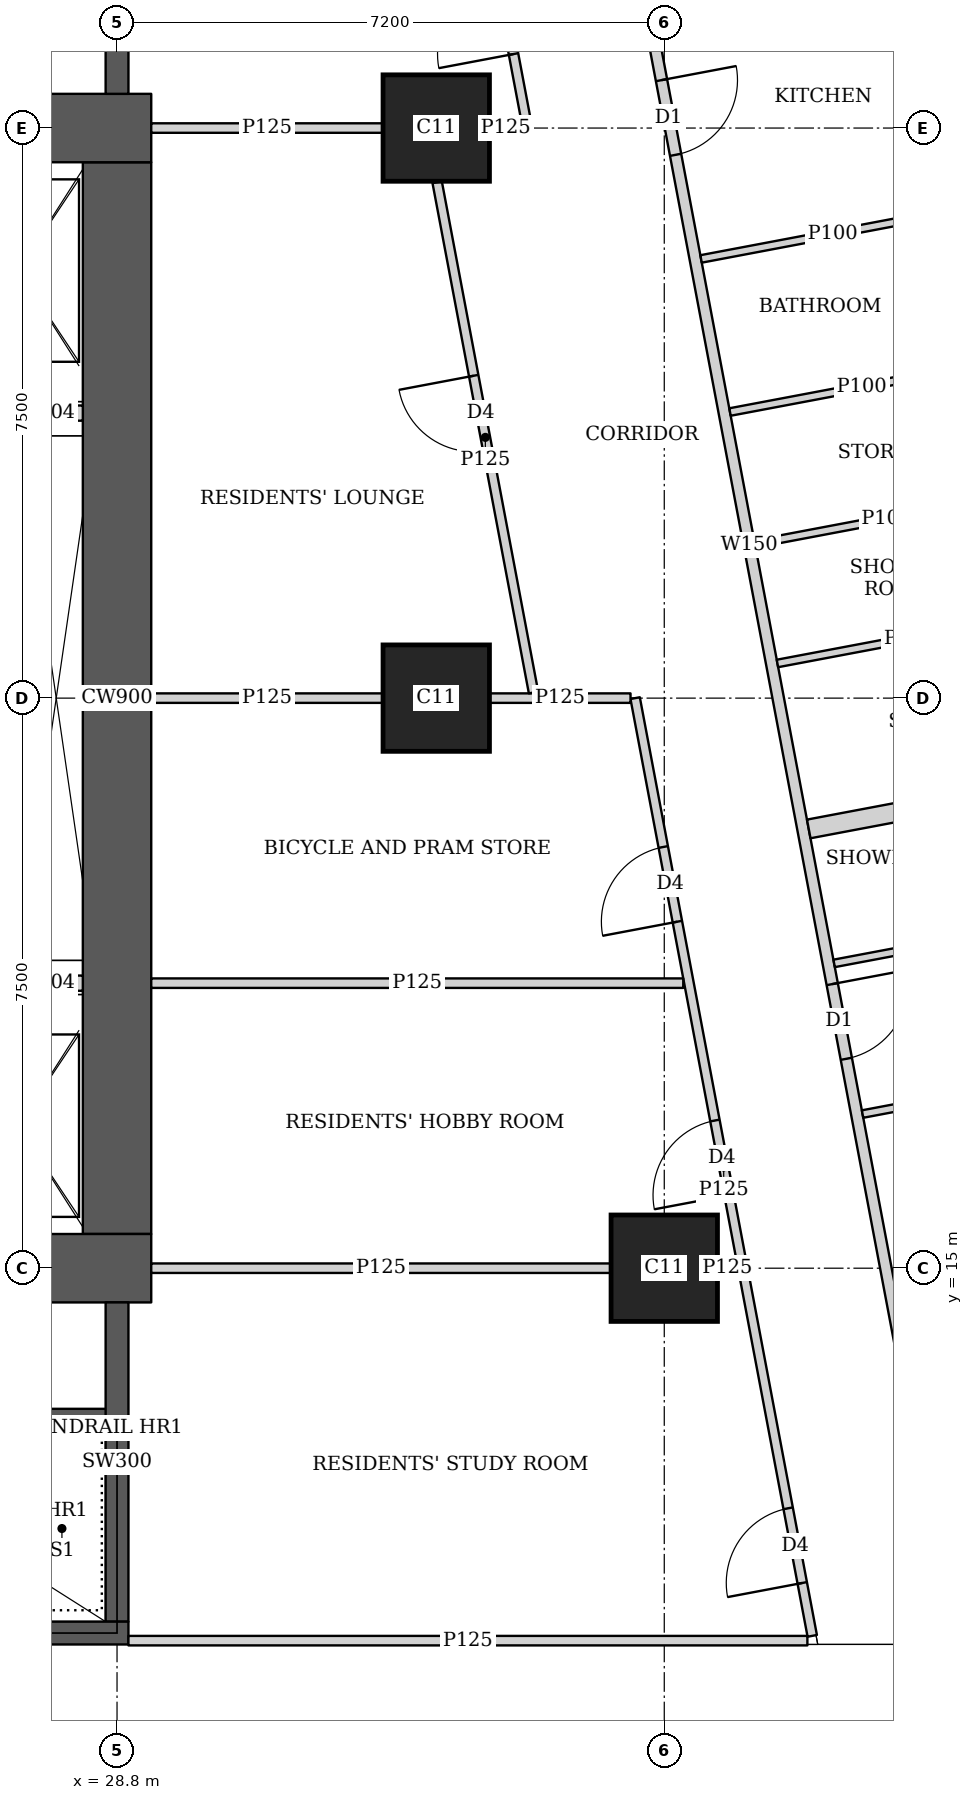
"""IFC4 building model, lengths in metres.
Left out: names, types, materials, properties, quantities, classifications, styles, units other than length and angle.
Written with IfcOpenShell. Run it as: python <this file> out.ifc"""

import sys

from ifc_helpers import new_model, si_unit, direction, frame, frame_2d, origin, origin_2d, place, context, subcontext, project, spatial, rectangle, extrude, element, fill, save


model = new_model("IFC4")
c1 = context("Model", 3, precision=1e-05, world=origin(), true_north=direction((0.0, 1.0)))
c2 = subcontext(c1, "Body", "Model", "MODEL_VIEW")
j1 = project(units=[si_unit("LENGTHUNIT", "METRE"), si_unit("PLANEANGLEUNIT", "RADIAN")], contexts=[c1])
p1 = place(None, origin())
s1 = spatial("IfcSite", under=j1, at=p1, CompositionType="ELEMENT")
p2 = place(p1, origin())
s2 = spatial("IfcBuilding", under=s1, at=p2, CompositionType="ELEMENT")
p3 = place(p2, frame((0.0, 0.0, 255.35)))
s3 = spatial("IfcBuildingStorey", under=s2, at=p3, CompositionType="ELEMENT", Elevation=255.35)
for number, where, z_axis, x_axis in (
    (1, (36.0, 15.0, 0.0), (0.0, 0.0, 1.0), (1.0, 0.0, 0.0)),
    (2, (33.0, 22.5, 0.0), (0.0, 0.0, 1.0), (1.0, 0.0, 0.0)),
    (3, (33.0, 30.0, 0.0), (0.0, 0.0, 1.0), (1.0, 0.0, 0.0)),
):
    element("IfcColumn", number, at=place(p3, frame(where, z_axis=z_axis, x_axis=x_axis)), inside=s3, PredefinedType="COLUMN", context=c2, shape_type="SweptSolid", body=[
        extrude(rectangle(XDim=1.4, YDim=1.4, at=origin_2d()), origin(), (0.0, 0.0, 1.0), 3.75),
    ])
p4 = place(p3, frame((13.95, 15.0, 0.0), z_axis=(0.0, 0.0, 1.0), x_axis=(1.0, 0.0, 0.0)))
e4 = element("IfcWall", 4, at=p4, inside=s3, PredefinedType="SHEAR", context=c2, shape_type="SweptSolid", body=[
    extrude(rectangle(XDim=15.3, YDim=0.9, at=frame_2d((7.65, 0.0))), origin(), (0.0, 0.0, 1.0), 3.75),
])
p5 = place(p4, frame((4.45, 0.0, 0.0)))
e5 = element("IfcOpeningElement", 5, at=p5, cuts=e4, PredefinedType="OPENING", context=c2, shape_type="SweptSolid", body=[
    extrude(rectangle(XDim=1.8, YDim=2.1, at=frame_2d((0.9, 1.05))), frame((0.0, 0.46, 0.0), z_axis=(0.0, -1.0, 0.0), x_axis=(1.0, 0.0, 0.0)), (0.0, 0.0, 1.0), 0.92),
])
p6 = place(p4, frame((10.7, 0.0, 0.0)))
e6 = element("IfcOpeningElement", 6, at=p6, cuts=e4, PredefinedType="OPENING", context=c2, shape_type="SweptSolid", body=[
    extrude(rectangle(XDim=1.1, YDim=2.1, at=frame_2d((0.55, 1.05))), frame((0.0, 0.46, 0.0), z_axis=(0.0, -1.0, 0.0), x_axis=(1.0, 0.0, 0.0)), (0.0, 0.0, 1.0), 0.92),
])
p7 = place(p3, frame((13.95, 30.0, 0.0), z_axis=(0.0, 0.0, 1.0), x_axis=(1.0, 0.0, 0.0)))
e7 = element("IfcWall", 7, at=p7, inside=s3, PredefinedType="SHEAR", context=c2, shape_type="SweptSolid", body=[
    extrude(rectangle(XDim=15.3, YDim=0.9, at=frame_2d((7.65, 0.0))), origin(), (0.0, 0.0, 1.0), 3.75),
])
p8 = place(p7, frame((4.45, 0.0, 0.0)))
e8 = element("IfcOpeningElement", 8, at=p8, cuts=e7, PredefinedType="OPENING", context=c2, shape_type="SweptSolid", body=[
    extrude(rectangle(XDim=1.8, YDim=2.1, at=frame_2d((0.9, 1.05))), frame((0.0, 0.46, 0.0), z_axis=(0.0, -1.0, 0.0), x_axis=(1.0, 0.0, 0.0)), (0.0, 0.0, 1.0), 0.92),
])
p9 = place(p7, frame((10.7, 0.0, 0.0)))
e9 = element("IfcOpeningElement", 9, at=p9, cuts=e7, PredefinedType="OPENING", context=c2, shape_type="SweptSolid", body=[
    extrude(rectangle(XDim=1.1, YDim=2.1, at=frame_2d((0.55, 1.05))), frame((0.0, 0.46, 0.0), z_axis=(0.0, -1.0, 0.0), x_axis=(1.0, 0.0, 0.0)), (0.0, 0.0, 1.0), 0.92),
])
p10 = place(p3, frame((28.8, 15.45, 0.0), z_axis=(0.0, 0.0, 1.0), x_axis=(0.0, 1.0, 0.0)))
e10 = element("IfcWall", 10, at=p10, inside=s3, PredefinedType="SHEAR", context=c2, shape_type="SweptSolid", body=[
    extrude(rectangle(XDim=14.1, YDim=0.9, at=frame_2d((7.05, 0.0))), origin(), (0.0, 0.0, 1.0), 3.75),
])
p11 = place(p3, frame((21.45, 10.2, 0.0), z_axis=(0.0, 0.0, 1.0), x_axis=(1.0, 0.0, 0.0)))
e11 = element("IfcWall", 11, at=p11, inside=s3, PredefinedType="SHEAR", context=c2, shape_type="SweptSolid", body=[
    extrude(rectangle(XDim=7.5, YDim=0.3, at=frame_2d((3.75, 0.0))), origin(), (0.0, 0.0, 1.0), 3.75),
])
p12 = place(p11, frame((1.2, 0.0, 0.0)))
e12 = element("IfcOpeningElement", 12, at=p12, cuts=e11, PredefinedType="OPENING", context=c2, shape_type="SweptSolid", body=[
    extrude(rectangle(XDim=1.1, YDim=2.1, at=frame_2d((0.55, 1.05))), frame((0.0, 0.16, 0.0), z_axis=(0.0, -1.0, 0.0), x_axis=(1.0, 0.0, 0.0)), (0.0, 0.0, 1.0), 0.32),
])
for number, where, z_axis, x_axis in (
    (13, (28.8, 10.35, 0.0), (0.0, 0.0, 1.0), (0.0, 1.0, 0.0)),
    (14, (28.8, 30.45, 0.0), (0.0, 0.0, 1.0), (0.0, 1.0, 0.0)),
):
    element("IfcWall", number, at=place(p3, frame(where, z_axis=z_axis, x_axis=x_axis)), inside=s3, PredefinedType="SHEAR", context=c2, shape_type="SweptSolid", body=[
        extrude(rectangle(XDim=4.2, YDim=0.3, at=frame_2d((2.1, 0.0))), origin(), (0.0, 0.0, 1.0), 3.75),
    ])
p13 = place(p3, frame((33.781, 42.186, 0.0), z_axis=(0.0, 0.0, 1.0), x_axis=(0.185593518645, -0.9826266055, 0.0)))
e15 = element("IfcWall", 15, at=p13, inside=s3, PredefinedType="SOLIDWALL", context=c2, shape_type="SweptSolid", body=[
    extrude(rectangle(XDim=35.961, YDim=0.15, at=frame_2d((17.98, 0.0))), origin(), (0.0, 0.0, 1.0), 2.5),
])
p14 = place(p13, frame((7.183, 0.0, 0.0)))
e16 = element("IfcOpeningElement", 16, at=p14, cuts=e15, PredefinedType="OPENING", context=c2, shape_type="SweptSolid", body=[
    extrude(rectangle(XDim=1.0, YDim=2.1, at=frame_2d((0.5, 1.05))), frame((0.0, 0.085, 0.0), z_axis=(0.0, -1.0, 0.0), x_axis=(1.0, 0.0, 0.0)), (0.0, 0.0, 1.0), 0.17),
])
p15 = place(p13, frame((11.76, 0.0, 0.0)))
e17 = element("IfcOpeningElement", 17, at=p15, cuts=e15, PredefinedType="OPENING", context=c2, shape_type="SweptSolid", body=[
    extrude(rectangle(XDim=1.0, YDim=2.1, at=frame_2d((0.5, 1.05))), frame((0.0, 0.085, 0.0), z_axis=(0.0, -1.0, 0.0), x_axis=(1.0, 0.0, 0.0)), (0.0, 0.0, 1.0), 0.17),
])
p16 = place(p13, frame((23.863, 0.0, 0.0)))
e18 = element("IfcOpeningElement", 18, at=p16, cuts=e15, PredefinedType="OPENING", context=c2, shape_type="SweptSolid", body=[
    extrude(rectangle(XDim=1.0, YDim=2.1, at=frame_2d((0.5, 1.05))), frame((0.0, 0.085, 0.0), z_axis=(0.0, -1.0, 0.0), x_axis=(1.0, 0.0, 0.0)), (0.0, 0.0, 1.0), 0.17),
])
p17 = place(p13, frame((30.502, 0.0, 0.0)))
e19 = element("IfcOpeningElement", 19, at=p17, cuts=e15, PredefinedType="OPENING", context=c2, shape_type="SweptSolid", body=[
    extrude(rectangle(XDim=1.0, YDim=2.1, at=frame_2d((0.5, 1.05))), frame((0.0, 0.085, 0.0), z_axis=(0.0, -1.0, 0.0), x_axis=(1.0, 0.0, 0.0)), (0.0, 0.0, 1.0), 0.17),
])
p18 = place(p3, frame((39.948, 28.933, 0.0), z_axis=(0.0, 0.0, 1.0), x_axis=(-0.982588017646, -0.185797706064, 0.0)))
e20 = element("IfcWall", 20, at=p18, inside=s3, PredefinedType="PARTITIONING", context=c2, shape_type="SweptSolid", body=[
    extrude(rectangle(XDim=3.525, YDim=0.1, at=frame_2d((1.763, 0.0))), origin(), (0.0, 0.0, 1.0), 3.5),
])
p19 = place(p3, frame((40.656, 25.183, 0.0), z_axis=(0.0, 0.0, 1.0), x_axis=(-0.982576058723, -0.185860939478, 0.0)))
e21 = element("IfcWall", 21, at=p19, inside=s3, PredefinedType="PARTITIONING", context=c2, shape_type="SweptSolid", body=[
    extrude(rectangle(XDim=3.524, YDim=0.1, at=frame_2d((1.762, 0.0))), origin(), (0.0, 0.0, 1.0), 3.5),
])
p20 = place(p3, frame((40.329, 26.918, 0.0), z_axis=(0.0, 0.0, 1.0), x_axis=(-0.982638553676, -0.185530247748, 0.0)))
e22 = element("IfcWall", 22, at=p20, inside=s3, PredefinedType="PARTITIONING", context=c2, shape_type="SweptSolid", body=[
    extrude(rectangle(XDim=3.525, YDim=0.1, at=frame_2d((1.763, 0.0))), origin(), (0.0, 0.0, 1.0), 3.5),
])
p21 = place(p3, frame((40.954, 23.61, 0.0), z_axis=(0.0, 0.0, 1.0), x_axis=(-0.98264808502, -0.18547975902, 0.0)))
e23 = element("IfcWall", 23, at=p21, inside=s3, PredefinedType="PARTITIONING", context=c2, shape_type="SweptSolid", body=[
    extrude(rectangle(XDim=3.526, YDim=0.1, at=frame_2d((1.763, 0.0))), origin(), (0.0, 0.0, 1.0), 2.5),
])
p22 = place(p3, frame((41.798, 19.682, 0.0), z_axis=(0.0, 0.0, 1.0), x_axis=(-0.982681091817, -0.185304807776, 0.0)))
e24 = element("IfcWall", 24, at=p22, inside=s3, PredefinedType="PARTITIONING", context=c2, shape_type="SweptSolid", body=[
    extrude(rectangle(XDim=3.626, YDim=0.1, at=frame_2d((1.813, 0.0))), origin(), (0.0, 0.0, 1.0), 3.5),
])
p23 = place(p3, frame((42.074, 17.682, 0.0), z_axis=(0.0, 0.0, 1.0), x_axis=(-0.982660701716, -0.185412904897, 0.0)))
e25 = element("IfcWall", 25, at=p23, inside=s3, PredefinedType="PARTITIONING", context=c2, shape_type="SweptSolid", body=[
    extrude(rectangle(XDim=3.526, YDim=0.1, at=frame_2d((1.763, 0.0))), origin(), (0.0, 0.0, 1.0), 3.5),
])
p24 = place(p23, frame((1.326, 0.0, 0.0)))
e26 = element("IfcOpeningElement", 26, at=p24, cuts=e25, PredefinedType="OPENING", context=c2, shape_type="SweptSolid", body=[
    extrude(rectangle(XDim=0.9, YDim=2.1, at=frame_2d((0.45, 1.05))), frame((0.0, 0.06, 0.0), z_axis=(0.0, -1.0, 0.0), x_axis=(1.0, 0.0, 0.0)), (0.0, 0.0, 1.0), 0.12),
])
p25 = place(p3, frame((42.593, 21.665, 0.0), z_axis=(0.0, 0.0, 1.0), x_axis=(-0.982635807605, -0.185544791394, 0.0)))
e27 = element("IfcWall", 27, at=p25, inside=s3, PredefinedType="SOLIDWALL", context=c2, shape_type="SweptSolid", body=[
    extrude(rectangle(XDim=4.775, YDim=0.25, at=frame_2d((2.388, 0.0))), origin(), (0.0, 0.0, 1.0), 2.5),
])
p26 = place(p3, frame((28.95, 10.1, 0.0), z_axis=(0.0, 0.0, 1.0), x_axis=(1.0, 0.0, 0.0)))
e28 = element("IfcWall", 28, at=p26, inside=s3, PredefinedType="PARTITIONING", context=c2, shape_type="SweptSolid", body=[
    extrude(rectangle(XDim=8.933, YDim=0.125, at=frame_2d((4.467, 0.0))), origin(), (0.0, 0.0, 1.0), 3.5),
])
p27 = place(p3, frame((37.947, 10.163, 0.0), z_axis=(0.0, 0.0, 1.0), x_axis=(-0.185589250699, 0.982627411599, 0.0)))
e29 = element("IfcWall", 29, at=p27, inside=s3, PredefinedType="PARTITIONING", context=c2, shape_type="SweptSolid", body=[
    extrude(rectangle(XDim=12.555, YDim=0.125, at=frame_2d((6.277, 0.0))), origin(), (0.0, 0.0, 1.0), 2.5),
])
p28 = place(p27, frame((0.708, 0.0, 0.0)))
e30 = element("IfcOpeningElement", 30, at=p28, cuts=e29, PredefinedType="OPENING", context=c2, shape_type="SweptSolid", body=[
    extrude(rectangle(XDim=1.0, YDim=2.1, at=frame_2d((0.5, 1.05))), frame((0.0, 0.073, 0.0), z_axis=(0.0, -1.0, 0.0), x_axis=(1.0, 0.0, 0.0)), (0.0, 0.0, 1.0), 0.145),
])
p29 = place(p27, frame((5.9, 0.0, 0.0)))
e31 = element("IfcOpeningElement", 31, at=p29, cuts=e29, PredefinedType="OPENING", context=c2, shape_type="SweptSolid", body=[
    extrude(rectangle(XDim=1.0, YDim=2.1, at=frame_2d((0.5, 1.05))), frame((0.0, 0.073, 0.0), z_axis=(0.0, -1.0, 0.0), x_axis=(1.0, 0.0, 0.0)), (0.0, 0.0, 1.0), 0.145),
])
p30 = place(p27, frame((9.562, 0.0, 0.0)))
e32 = element("IfcOpeningElement", 32, at=p30, cuts=e29, PredefinedType="OPENING", context=c2, shape_type="SweptSolid", body=[
    extrude(rectangle(XDim=1.0, YDim=2.1, at=frame_2d((0.5, 1.05))), frame((0.0, 0.073, 0.0), z_axis=(0.0, -1.0, 0.0), x_axis=(1.0, 0.0, 0.0)), (0.0, 0.0, 1.0), 0.145),
])
p31 = place(p3, frame((34.193, 30.04, 0.0), z_axis=(0.0, 0.0, 1.0), x_axis=(-0.185556349615, 0.98263362507, 0.0)))
e33 = element("IfcWall", 33, at=p31, inside=s3, PredefinedType="PARTITIONING", context=c2, shape_type="SweptSolid", body=[
    extrude(rectangle(XDim=4.883, YDim=0.125, at=frame_2d((2.441, 0.0))), origin(), (0.0, 0.0, 1.0), 2.5),
])
p32 = place(p31, frame((0.95, 0.0, 0.0)))
e34 = element("IfcOpeningElement", 34, at=p32, cuts=e33, PredefinedType="OPENING", context=c2, shape_type="SweptSolid", body=[
    extrude(rectangle(XDim=1.0, YDim=2.1, at=frame_2d((0.5, 1.05))), frame((0.0, 0.073, 0.0), z_axis=(0.0, -1.0, 0.0), x_axis=(1.0, 0.0, 0.0)), (0.0, 0.0, 1.0), 0.145),
])
p33 = place(p3, frame((34.28, 22.574, 0.0), z_axis=(0.0, 0.0, 1.0), x_axis=(-0.185610991981, 0.982623305064, 0.0)))
e35 = element("IfcWall", 35, at=p33, inside=s3, PredefinedType="PARTITIONING", context=c2, shape_type="SweptSolid", body=[
    extrude(rectangle(XDim=6.832, YDim=0.125, at=frame_2d((3.416, 0.0))), origin(), (0.0, 0.0, 1.0), 2.5),
])
p34 = place(p33, frame((3.241, 0.0, 0.0)))
e36 = element("IfcOpeningElement", 36, at=p34, cuts=e35, PredefinedType="OPENING", context=c2, shape_type="SweptSolid", body=[
    extrude(rectangle(XDim=1.0, YDim=2.1, at=frame_2d((0.5, 1.05))), frame((0.0, 0.073, 0.0), z_axis=(0.0, -1.0, 0.0), x_axis=(1.0, 0.0, 0.0)), (0.0, 0.0, 1.0), 0.145),
])
p35 = place(p3, frame((29.25, 15.0, 0.0), z_axis=(0.0, 0.0, 1.0), x_axis=(1.0, 0.0, 0.0)))
e37 = element("IfcWall", 37, at=p35, inside=s3, PredefinedType="PARTITIONING", context=c2, shape_type="SweptSolid", body=[
    extrude(rectangle(XDim=6.049, YDim=0.125, at=frame_2d((3.024, 0.0))), origin(), (0.0, 0.0, 1.0), 3.5),
])
p36 = place(p3, frame((36.701, 15.0, 0.0), z_axis=(0.0, 0.0, 1.0), x_axis=(1.0, 0.0, 0.0)))
e38 = element("IfcWall", 38, at=p36, inside=s3, PredefinedType="PARTITIONING", context=c2, shape_type="SweptSolid", body=[
    extrude(rectangle(XDim=0.257, YDim=0.125, at=frame_2d((0.128, 0.0))), origin(), (0.0, 0.0, 1.0), 3.5),
])
p37 = place(p3, frame((29.25, 18.75, 0.0), z_axis=(0.0, 0.0, 1.0), x_axis=(1.0, 0.0, 0.0)))
e39 = element("IfcWall", 39, at=p37, inside=s3, PredefinedType="PARTITIONING", context=c2, shape_type="SweptSolid", body=[
    extrude(rectangle(XDim=7.0, YDim=0.125, at=frame_2d((3.5, 0.0))), origin(), (0.0, 0.0, 1.0), 3.5),
])
p38 = place(p3, frame((29.25, 22.5, 0.0), z_axis=(0.0, 0.0, 1.0), x_axis=(1.0, 0.0, 0.0)))
e40 = element("IfcWall", 40, at=p38, inside=s3, PredefinedType="PARTITIONING", context=c2, shape_type="SweptSolid", body=[
    extrude(rectangle(XDim=3.049, YDim=0.125, at=frame_2d((1.524, 0.0))), origin(), (0.0, 0.0, 1.0), 3.5),
])
p39 = place(p3, frame((33.701, 22.5, 0.0), z_axis=(0.0, 0.0, 1.0), x_axis=(1.0, 0.0, 0.0)))
e41 = element("IfcWall", 41, at=p39, inside=s3, PredefinedType="PARTITIONING", context=c2, shape_type="SweptSolid", body=[
    extrude(rectangle(XDim=1.855, YDim=0.125, at=frame_2d((0.927, 0.0))), origin(), (0.0, 0.0, 1.0), 2.5),
])
p40 = place(p3, frame((29.25, 30.0, 0.0), z_axis=(0.0, 0.0, 1.0), x_axis=(1.0, 0.0, 0.0)))
e42 = element("IfcWall", 42, at=p40, inside=s3, PredefinedType="PARTITIONING", context=c2, shape_type="SweptSolid", body=[
    extrude(rectangle(XDim=3.049, YDim=0.125, at=frame_2d((1.524, 0.0))), origin(), (0.0, 0.0, 1.0), 3.5),
])
p41 = place(p3, frame((33.701, 30.0, 0.0), z_axis=(0.0, 0.0, 1.0), x_axis=(1.0, 0.0, 0.0)))
e43 = element("IfcWall", 43, at=p41, inside=s3, PredefinedType="PARTITIONING", context=c2, shape_type="SweptSolid", body=[
    extrude(rectangle(XDim=0.424, YDim=0.125, at=frame_2d((0.212, 0.0))), origin(), (0.0, 0.0, 1.0), 2.5),
])
p42 = place(p3, frame((23.0, 13.05, 0.0), z_axis=(0.0, 0.0, 1.0), x_axis=(1.0, 0.0, 0.0)))
e44 = element("IfcWall", 44, at=p42, inside=s3, PredefinedType="SHEAR", context=c2, shape_type="SweptSolid", body=[
    extrude(rectangle(XDim=5.8, YDim=0.2, at=frame_2d((2.9, 0.0))), origin(), (0.0, 0.0, 1.0), 3.75),
])
for number, where, z_axis, x_axis in (
    (45, (27.4, 18.75, 0.0), (0.0, 0.0, 1.0), (1.0, 0.0, 0.0)),
    (46, (27.4, 26.25, 0.0), (0.0, 0.0, 1.0), (1.0, 0.0, 0.0)),
):
    element("IfcWall", number, at=place(p3, frame(where, z_axis=z_axis, x_axis=x_axis)), inside=s3, PredefinedType="SOLIDWALL", context=c2, shape_type="SweptSolid", body=[
        extrude(rectangle(XDim=0.95, YDim=0.2, at=frame_2d((0.475, 0.0))), origin(), (0.0, 0.0, 1.0), 3.5),
    ])
p43 = place(p15, origin())
e47 = element("IfcDoor", 47, at=p43, inside=s3, OperationType="SINGLE_SWING_LEFT", PredefinedType="DOOR", context=c2, shape_type="SweptSolid", body=[
    extrude(rectangle(XDim=1.0, YDim=2.1, at=frame_2d((0.5, 1.05))), frame((0.0, 0.025, 0.0), z_axis=(0.0, -1.0, 0.0), x_axis=(1.0, 0.0, 0.0)), (0.0, 0.0, 1.0), 0.05),
])
fill(e17, e47)
p44 = place(p16, origin())
e48 = element("IfcDoor", 48, at=p44, inside=s3, OperationType="SINGLE_SWING_LEFT", PredefinedType="DOOR", context=c2, shape_type="SweptSolid", body=[
    extrude(rectangle(XDim=1.0, YDim=2.1, at=frame_2d((0.5, 1.05))), frame((0.0, 0.025, 0.0), z_axis=(0.0, -1.0, 0.0), x_axis=(1.0, 0.0, 0.0)), (0.0, 0.0, 1.0), 0.05),
])
fill(e18, e48)
p45 = place(p28, origin())
e49 = element("IfcDoor", 49, at=p45, inside=s3, OperationType="SINGLE_SWING_LEFT", PredefinedType="DOOR", context=c2, shape_type="SweptSolid", body=[
    extrude(rectangle(XDim=1.0, YDim=2.1, at=frame_2d((0.5, 1.05))), frame((0.0, 0.025, 0.0), z_axis=(0.0, -1.0, 0.0), x_axis=(1.0, 0.0, 0.0)), (0.0, 0.0, 1.0), 0.05),
])
fill(e30, e49)
p46 = place(p29, origin())
e50 = element("IfcDoor", 50, at=p46, inside=s3, OperationType="SINGLE_SWING_LEFT", PredefinedType="DOOR", context=c2, shape_type="SweptSolid", body=[
    extrude(rectangle(XDim=1.0, YDim=2.1, at=frame_2d((0.5, 1.05))), frame((0.0, 0.025, 0.0), z_axis=(0.0, -1.0, 0.0), x_axis=(1.0, 0.0, 0.0)), (0.0, 0.0, 1.0), 0.05),
])
fill(e31, e50)
p47 = place(p30, origin())
e51 = element("IfcDoor", 51, at=p47, inside=s3, OperationType="SINGLE_SWING_LEFT", PredefinedType="DOOR", context=c2, shape_type="SweptSolid", body=[
    extrude(rectangle(XDim=1.0, YDim=2.1, at=frame_2d((0.5, 1.05))), frame((0.0, 0.025, 0.0), z_axis=(0.0, -1.0, 0.0), x_axis=(1.0, 0.0, 0.0)), (0.0, 0.0, 1.0), 0.05),
])
fill(e32, e51)
p48 = place(p34, origin())
e52 = element("IfcDoor", 52, at=p48, inside=s3, OperationType="SINGLE_SWING_RIGHT", PredefinedType="DOOR", context=c2, shape_type="SweptSolid", body=[
    extrude(rectangle(XDim=1.0, YDim=2.1, at=frame_2d((0.5, 1.05))), frame((0.0, 0.025, 0.0), z_axis=(0.0, -1.0, 0.0), x_axis=(1.0, 0.0, 0.0)), (0.0, 0.0, 1.0), 0.05),
])
fill(e36, e52)
p49 = place(p32, origin())
e53 = element("IfcDoor", 53, at=p49, inside=s3, OperationType="SINGLE_SWING_LEFT", PredefinedType="DOOR", context=c2, shape_type="SweptSolid", body=[
    extrude(rectangle(XDim=1.0, YDim=2.1, at=frame_2d((0.5, 1.05))), frame((0.0, 0.025, 0.0), z_axis=(0.0, -1.0, 0.0), x_axis=(1.0, 0.0, 0.0)), (0.0, 0.0, 1.0), 0.05),
])
fill(e34, e53)
save(model, sys.argv[1])
